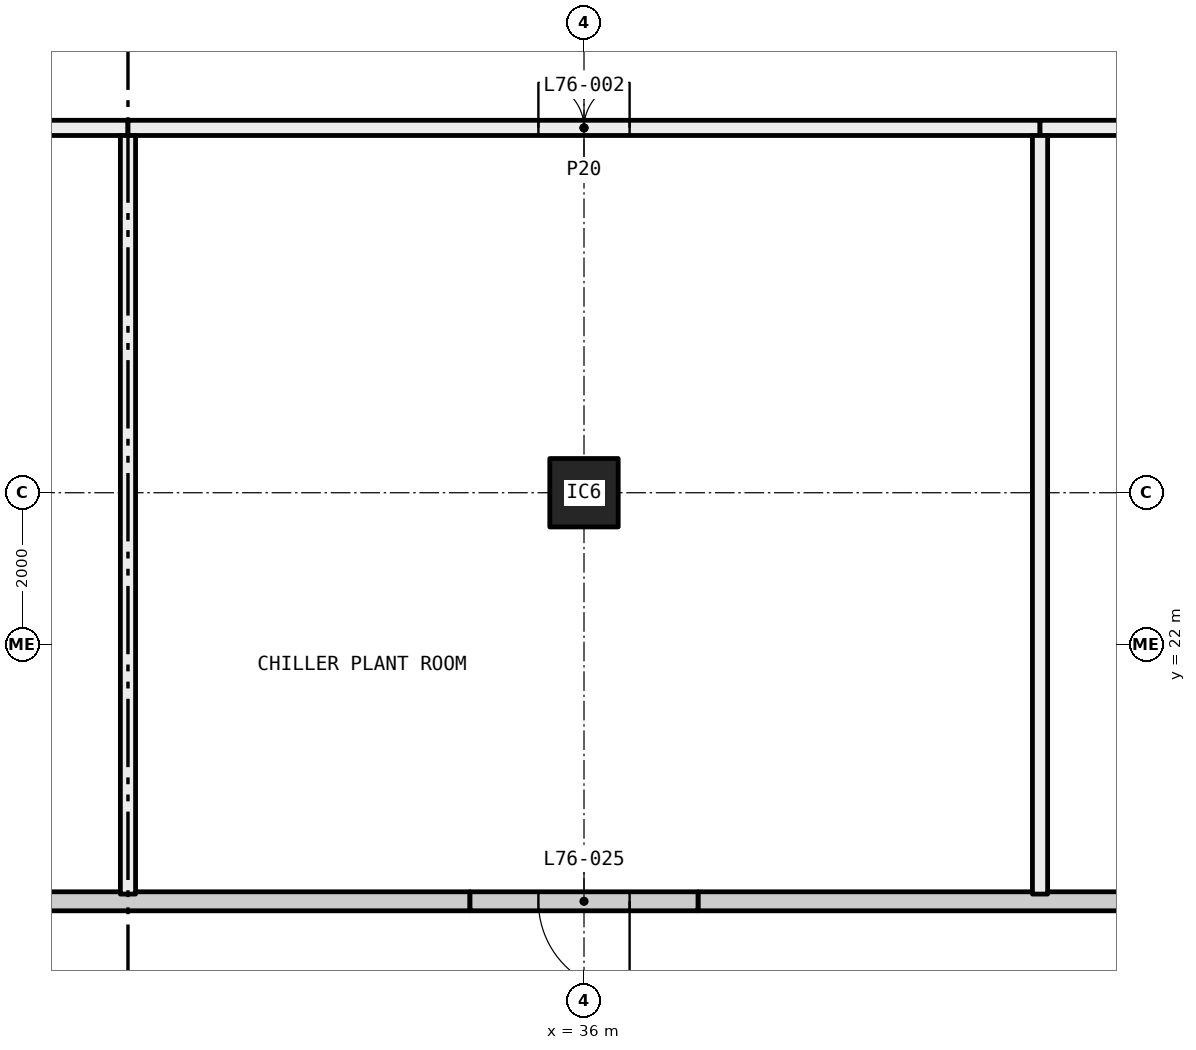
"""IFC4 building model, lengths in metres.
Left out: names, types, materials, properties, quantities, classifications, styles, units other than length and angle.
Written with IfcOpenShell. Run it as: python <this file> out.ifc"""

import sys

from ifc_helpers import new_model, si_unit, direction, frame, frame_2d, origin, origin_2d, place, context, subcontext, project, spatial, rectangle, hollow_rectangle, extrude, element, fill, save


model = new_model("IFC4")
c1 = context("Model", 3, precision=1e-05, world=origin(), true_north=direction((0.0, 1.0)))
c2 = subcontext(c1, "Body", "Model", "MODEL_VIEW")
j1 = project(units=[si_unit("LENGTHUNIT", "METRE"), si_unit("PLANEANGLEUNIT", "RADIAN")], contexts=[c1])
p1 = place(None, origin())
s1 = spatial("IfcSite", under=j1, at=p1, CompositionType="ELEMENT")
p2 = place(p1, origin())
s2 = spatial("IfcBuilding", under=s1, at=p2, CompositionType="ELEMENT")
p3 = place(p2, frame((0.0, 0.0, 283.35)))
s3 = spatial("IfcBuildingStorey", under=s2, at=p3, CompositionType="ELEMENT", Elevation=283.35)
p4 = place(p3, frame((36.0, 24.0, 0.0), z_axis=(0.0, 0.0, 1.0), x_axis=(1.0, 0.0, 0.0)))
e1 = element("IfcColumn", 1, at=p4, inside=s3, PredefinedType="COLUMN", context=c2, shape_type="SweptSolid", body=[
    extrude(hollow_rectangle(XDim=0.9, YDim=0.9, WallThickness=0.03, at=origin_2d()), origin(), (0.0, 0.0, 1.0), 5.6),
])
p5 = place(p3, frame((23.5, 28.8, 0.0), z_axis=(0.0, 0.0, 1.0), x_axis=(1.0, 0.0, 0.0)))
e2 = element("IfcWall", 2, at=p5, inside=s3, PredefinedType="PARTITIONING", context=c2, shape_type="SweptSolid", body=[
    extrude(rectangle(XDim=6.5, YDim=0.2, at=frame_2d((3.25, 0.0))), origin(), (0.0, 0.0, 1.0), 3.6),
])
p6 = place(p5, frame((2.65, 0.0, 0.0)))
e3 = element("IfcOpeningElement", 3, at=p6, cuts=e2, PredefinedType="OPENING", context=c2, shape_type="SweptSolid", body=[
    extrude(rectangle(XDim=1.2, YDim=2.1, at=frame_2d((0.6, 1.05))), frame((0.0, 0.11, 0.0), z_axis=(0.0, -1.0, 0.0), x_axis=(1.0, 0.0, 0.0)), (0.0, 0.0, 1.0), 0.22),
])
p7 = place(p3, frame((30.0, 28.8, 0.0), z_axis=(0.0, 0.0, 1.0), x_axis=(1.0, 0.0, 0.0)))
e4 = element("IfcWall", 4, at=p7, inside=s3, PredefinedType="PARTITIONING", context=c2, shape_type="SweptSolid", body=[
    extrude(rectangle(XDim=12.0, YDim=0.2, at=frame_2d((6.0, 0.0))), origin(), (0.0, 0.0, 1.0), 3.6),
])
p8 = place(p7, frame((5.4, 0.0, 0.0)))
e5 = element("IfcOpeningElement", 5, at=p8, cuts=e4, PredefinedType="OPENING", context=c2, shape_type="SweptSolid", body=[
    extrude(rectangle(XDim=1.2, YDim=2.1, at=frame_2d((0.6, 1.05))), frame((0.0, 0.11, 0.0), z_axis=(0.0, -1.0, 0.0), x_axis=(1.0, 0.0, 0.0)), (0.0, 0.0, 1.0), 0.22),
])
p9 = place(p3, frame((42.0, 28.8, 0.0), z_axis=(0.0, 0.0, 1.0), x_axis=(1.0, 0.0, 0.0)))
e6 = element("IfcWall", 6, at=p9, inside=s3, PredefinedType="PARTITIONING", context=c2, shape_type="SweptSolid", body=[
    extrude(rectangle(XDim=6.5, YDim=0.2, at=frame_2d((3.25, 0.0))), origin(), (0.0, 0.0, 1.0), 3.6),
])
p10 = place(p9, frame((2.65, 0.0, 0.0)))
e7 = element("IfcOpeningElement", 7, at=p10, cuts=e6, PredefinedType="OPENING", context=c2, shape_type="SweptSolid", body=[
    extrude(rectangle(XDim=1.2, YDim=2.1, at=frame_2d((0.6, 1.05))), frame((0.0, 0.11, 0.0), z_axis=(0.0, -1.0, 0.0), x_axis=(1.0, 0.0, 0.0)), (0.0, 0.0, 1.0), 0.22),
])
for number, where, z_axis, x_axis in (
    (8, (30.0, 18.72, 0.0), (0.0, 0.0, 1.0), (0.0, 1.0, 0.0)),
    (9, (42.0, 18.72, 0.0), (0.0, 0.0, 1.0), (0.0, 1.0, 0.0)),
):
    element("IfcWall", number, at=place(p3, frame(where, z_axis=z_axis, x_axis=x_axis)), inside=s3, PredefinedType="PARTITIONING", context=c2, shape_type="SweptSolid", body=[
        extrude(rectangle(XDim=9.98, YDim=0.2, at=frame_2d((4.99, 0.0))), origin(), (0.0, 0.0, 1.0), 5.6),
    ])
for number, where, z_axis, x_axis in (
    (10, (12.5, 18.625, 0.0), (0.0, 0.0, 1.0), (1.0, 0.0, 0.0)),
    (11, (37.5, 18.625, 0.0), (0.0, 0.0, 1.0), (1.0, 0.0, 0.0)),
):
    element("IfcWall", number, at=place(p3, frame(where, z_axis=z_axis, x_axis=x_axis)), inside=s3, PredefinedType="SOLIDWALL", context=c2, shape_type="SweptSolid", body=[
        extrude(rectangle(XDim=22.0, YDim=0.25, at=frame_2d((11.0, 0.0))), origin(), (0.0, 0.0, 1.0), 1.2),
    ])
p11 = place(p3, frame((34.5, 18.625, 0.0), z_axis=(0.0, 0.0, 1.0), x_axis=(1.0, 0.0, 0.0)))
e12 = element("IfcWall", 12, at=p11, inside=s3, PredefinedType="SOLIDWALL", context=c2, shape_type="SweptSolid", body=[
    extrude(rectangle(XDim=3.0, YDim=0.25, at=frame_2d((1.5, 0.0))), origin(), (0.0, 0.0, 1.0), 5.6),
])
p12 = place(p11, frame((0.9, 0.0, 0.0)))
e13 = element("IfcOpeningElement", 13, at=p12, cuts=e12, PredefinedType="OPENING", context=c2, shape_type="SweptSolid", body=[
    extrude(rectangle(XDim=1.2, YDim=2.1, at=frame_2d((0.6, 1.05))), frame((0.0, 0.135, 0.0), z_axis=(0.0, -1.0, 0.0), x_axis=(1.0, 0.0, 0.0)), (0.0, 0.0, 1.0), 0.27),
])
p13 = place(p8, origin())
e14 = element("IfcDoor", 14, at=p13, inside=s3, OperationType="DOUBLE_DOOR_SINGLE_SWING", PredefinedType="DOOR", context=c2, shape_type="SweptSolid", body=[
    extrude(rectangle(XDim=1.2, YDim=2.1, at=frame_2d((0.6, 1.05))), frame((0.0, 0.025, 0.0), z_axis=(0.0, -1.0, 0.0), x_axis=(1.0, 0.0, 0.0)), (0.0, 0.0, 1.0), 0.05),
])
fill(e5, e14)
p14 = place(p12, frame((1.2, 0.0, 0.0), x_axis=(-1.0, 0.0, 0.0)))
e15 = element("IfcDoor", 15, at=p14, inside=s3, OperationType="SINGLE_SWING_RIGHT", PredefinedType="DOOR", context=c2, shape_type="SweptSolid", body=[
    extrude(rectangle(XDim=1.2, YDim=2.1, at=frame_2d((0.6, 1.05))), frame((0.0, 0.025, 0.0), z_axis=(0.0, -1.0, 0.0), x_axis=(1.0, 0.0, 0.0)), (0.0, 0.0, 1.0), 0.05),
])
fill(e13, e15)
save(model, sys.argv[1])
